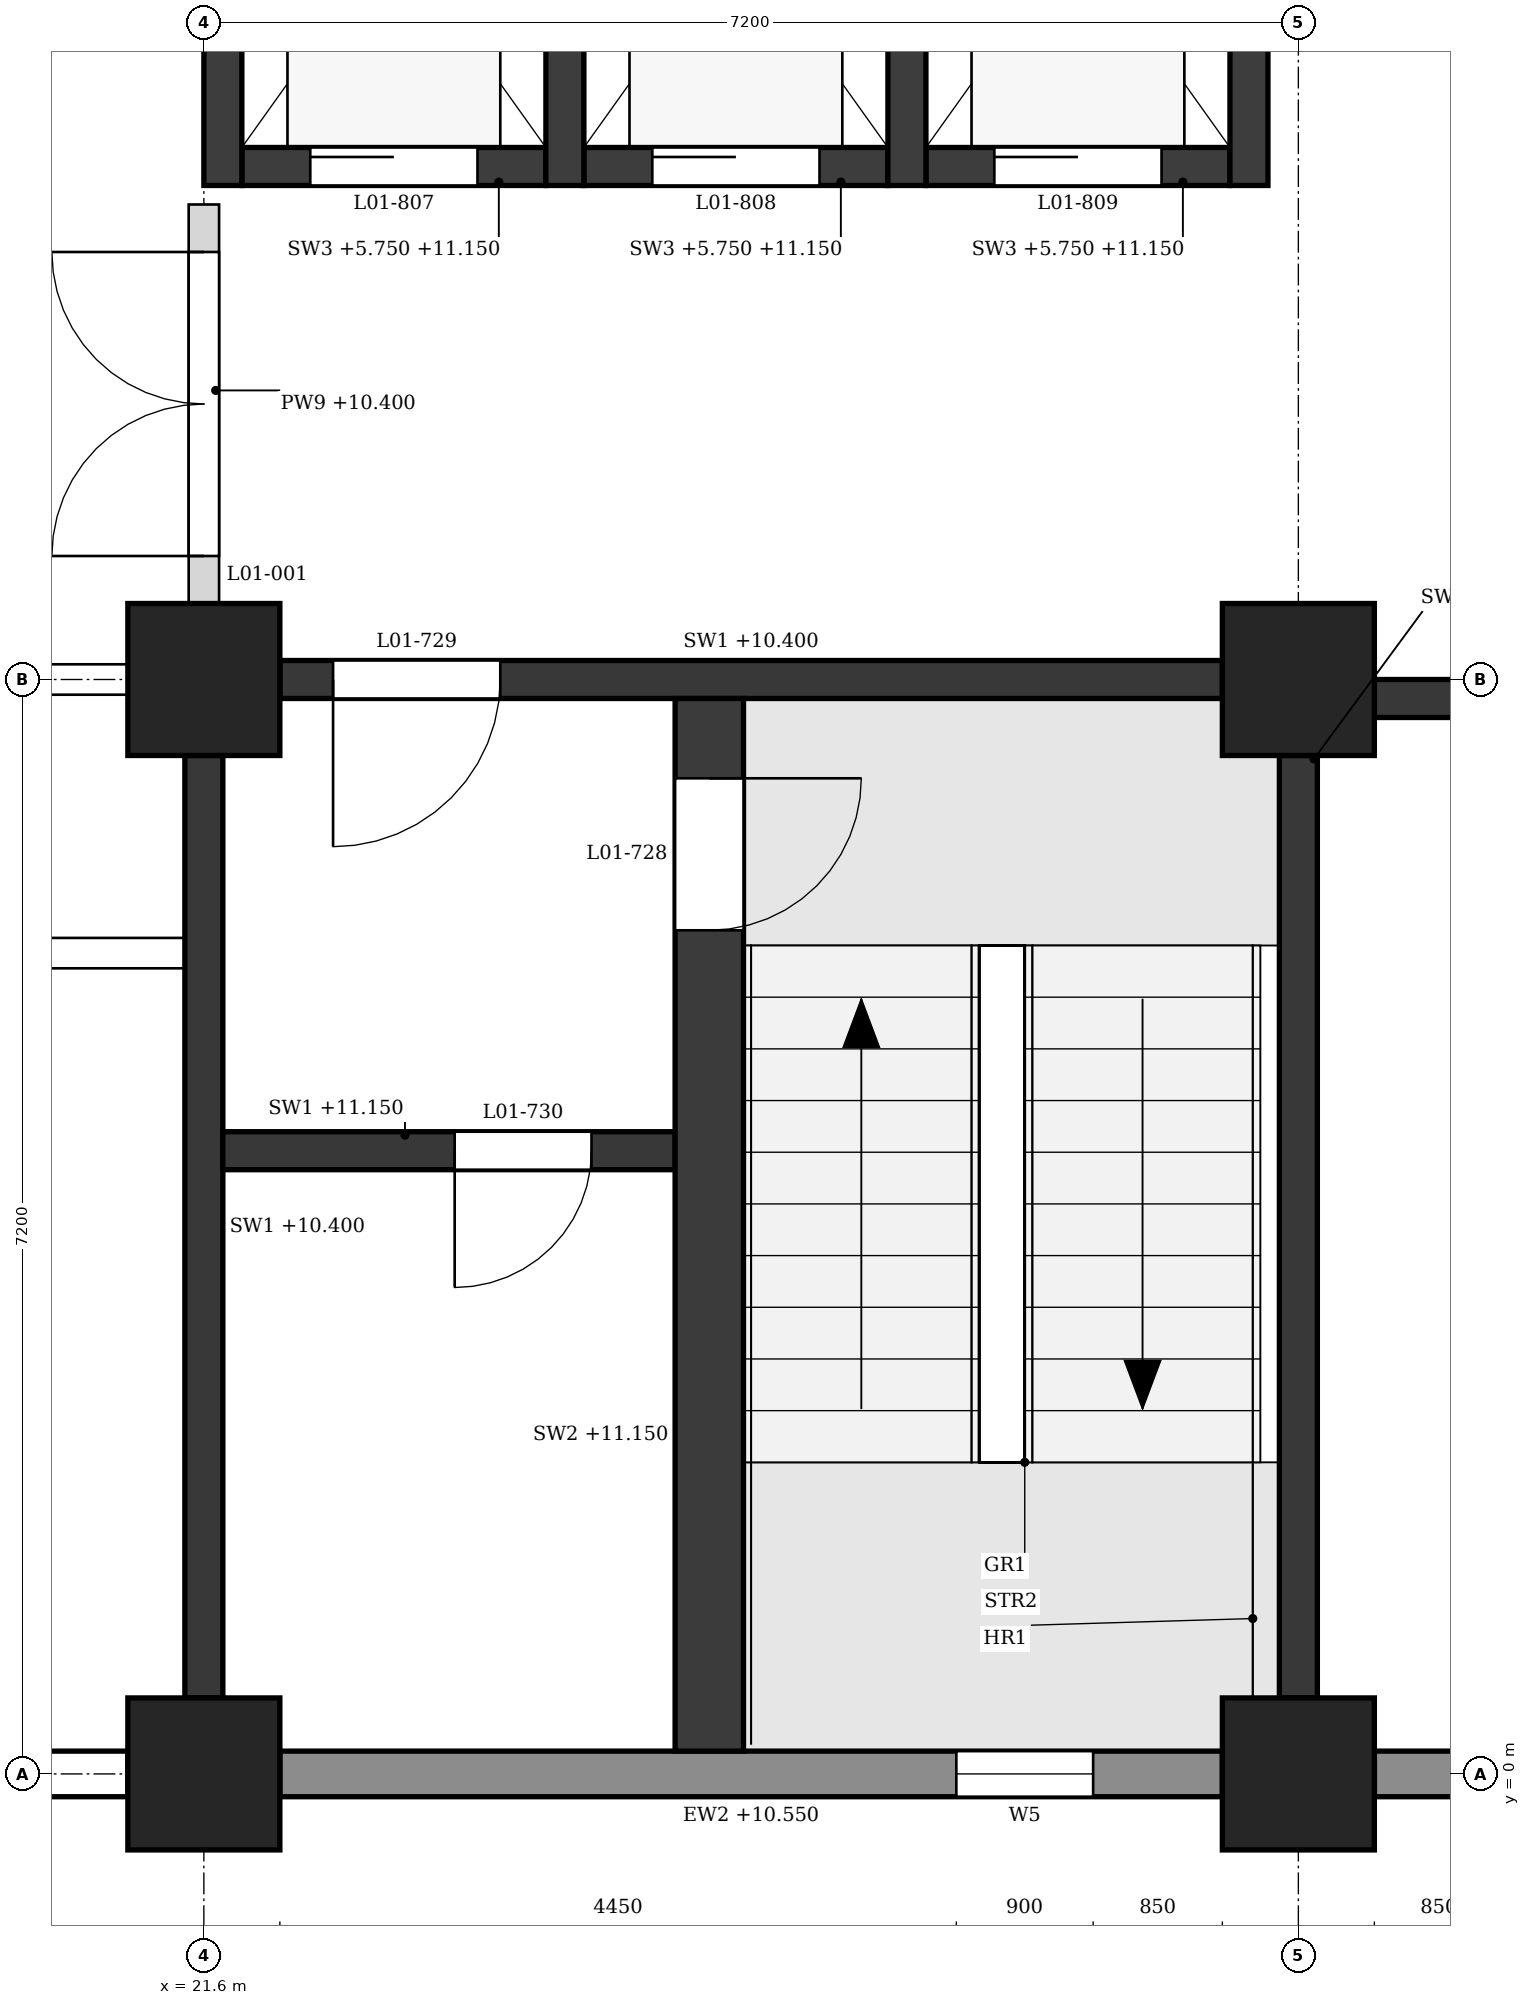
"""IFC4 building model, lengths in metres.
Left out: names, types, materials, properties, quantities, classifications, styles, units other than length and angle.
Written with IfcOpenShell. Run it as: python <this file> out.ifc"""

import sys

from ifc_helpers import new_model, si_unit, direction, frame, frame_2d, origin, origin_2d, place, context, subcontext, project, spatial, polyline, rectangle, outline, extrude, element, fill, save


model = new_model("IFC4")
c1 = context("Model", 3, precision=1e-05, world=origin(), true_north=direction((0.0, 1.0)))
c2 = subcontext(c1, "Body", "Model", "MODEL_VIEW")
j1 = project(units=[si_unit("LENGTHUNIT", "METRE"), si_unit("PLANEANGLEUNIT", "RADIAN")], contexts=[c1])
p1 = place(None, origin())
s1 = spatial("IfcSite", under=j1, at=p1, CompositionType="ELEMENT")
p2 = place(p1, origin())
s2 = spatial("IfcBuilding", under=s1, at=p2, CompositionType="ELEMENT")
p3 = place(p2, frame((0.0, 0.0, 6.0)))
s3 = spatial("IfcBuildingStorey", under=s2, at=p3, CompositionType="ELEMENT", Elevation=6.0)
for number, where, z_axis, x_axis in (
    (1, (21.6, 0.0, 0.0), (0.0, 0.0, 1.0), (1.0, 0.0, 0.0)),
    (2, (21.6, 7.2, 0.0), (0.0, 0.0, 1.0), (1.0, 0.0, 0.0)),
    (3, (28.8, 0.0, 0.0), (0.0, 0.0, 1.0), (1.0, 0.0, 0.0)),
    (4, (28.8, 7.2, 0.0), (0.0, 0.0, 1.0), (1.0, 0.0, 0.0)),
):
    element("IfcColumn", number, at=place(p3, frame(where, z_axis=z_axis, x_axis=x_axis)), inside=s3, PredefinedType="COLUMN", context=c2, shape_type="SweptSolid", body=[
        extrude(rectangle(XDim=1.0, YDim=1.0, at=origin_2d()), origin(), (0.0, 0.0, 1.0), 5.4),
    ])
p4 = place(p3, frame((14.9, 0.0, 0.0), z_axis=(0.0, 0.0, 1.0), x_axis=(1.0, 0.0, 0.0)))
e5 = element("IfcWall", 5, at=p4, inside=s3, PredefinedType="STANDARD", context=c2, shape_type="SweptSolid", body=[
    extrude(rectangle(XDim=6.2, YDim=0.3, at=frame_2d((3.1, 0.0))), origin(), (0.0, 0.0, 1.0), 4.55),
])
p5 = place(p4, frame((0.55, 0.0, 0.9)))
e6 = element("IfcOpeningElement", 6, at=p5, cuts=e5, PredefinedType="OPENING", context=c2, shape_type="SweptSolid", body=[
    extrude(outline(polyline([(0.0, 0.0), (1.5, 0.0), (1.5, 2.85), (0.75, 3.6), (0.0, 2.85), (0.0, 0.0)])), frame((0.0, 0.16, 0.0), z_axis=(0.0, -1.0, 0.0), x_axis=(1.0, 0.0, 0.0)), (0.0, 0.0, 1.0), 0.32),
])
p6 = place(p4, frame((4.15, 0.0, 0.9)))
e7 = element("IfcOpeningElement", 7, at=p6, cuts=e5, PredefinedType="OPENING", context=c2, shape_type="SweptSolid", body=[
    extrude(outline(polyline([(0.0, 0.0), (1.5, 0.0), (1.5, 2.85), (0.75, 3.6), (0.0, 2.85), (0.0, 0.0)])), frame((0.0, 0.16, 0.0), z_axis=(0.0, -1.0, 0.0), x_axis=(1.0, 0.0, 0.0)), (0.0, 0.0, 1.0), 0.32),
])
p7 = place(p3, frame((22.1, 0.0, 0.0), z_axis=(0.0, 0.0, 1.0), x_axis=(1.0, 0.0, 0.0)))
e8 = element("IfcWall", 8, at=p7, inside=s3, PredefinedType="STANDARD", context=c2, shape_type="SweptSolid", body=[
    extrude(rectangle(XDim=6.2, YDim=0.3, at=frame_2d((3.1, 0.0))), origin(), (0.0, 0.0, 1.0), 4.55),
])
p8 = place(p7, frame((4.45, 0.0, 0.9)))
e9 = element("IfcOpeningElement", 9, at=p8, cuts=e8, PredefinedType="OPENING", context=c2, shape_type="SweptSolid", body=[
    extrude(outline(polyline([(0.0, 0.0), (0.9, 0.0), (0.9, 3.15), (0.45, 3.6), (0.0, 3.15), (0.0, 0.0)])), frame((0.0, 0.16, 0.0), z_axis=(0.0, -1.0, 0.0), x_axis=(1.0, 0.0, 0.0)), (0.0, 0.0, 1.0), 0.32),
])
p9 = place(p3, frame((29.3, 0.0, 0.0), z_axis=(0.0, 0.0, 1.0), x_axis=(1.0, 0.0, 0.0)))
e10 = element("IfcWall", 10, at=p9, inside=s3, PredefinedType="STANDARD", context=c2, shape_type="SweptSolid", body=[
    extrude(rectangle(XDim=6.275, YDim=0.3, at=frame_2d((3.137, 0.0))), origin(), (0.0, 0.0, 1.0), 4.7),
])
p10 = place(p9, frame((0.85, 0.0, 0.9)))
e11 = element("IfcOpeningElement", 11, at=p10, cuts=e10, PredefinedType="OPENING", context=c2, shape_type="SweptSolid", body=[
    extrude(outline(polyline([(0.0, 0.0), (0.9, 0.0), (0.9, 3.15), (0.45, 3.6), (0.0, 3.15), (0.0, 0.0)])), frame((0.0, 0.16, 0.0), z_axis=(0.0, -1.0, 0.0), x_axis=(1.0, 0.0, 0.0)), (0.0, 0.0, 1.0), 0.32),
])
p11 = place(p3, frame((29.3, 7.075, 0.0), z_axis=(0.0, 0.0, 1.0), x_axis=(1.0, 0.0, 0.0)))
e12 = element("IfcWall", 12, at=p11, inside=s3, PredefinedType="SHEAR", context=c2, shape_type="SweptSolid", body=[
    extrude(rectangle(XDim=6.275, YDim=0.25, at=frame_2d((3.137, 0.0))), origin(), (0.0, 0.0, 1.0), 4.7),
])
p12 = place(p3, frame((28.8, 0.5, -0.25), z_axis=(0.0, 0.0, 1.0), x_axis=(0.0, 1.0, 0.0)))
e13 = element("IfcWall", 13, at=p12, inside=s3, PredefinedType="SHEAR", context=c2, shape_type="SweptSolid", body=[
    extrude(rectangle(XDim=6.2, YDim=0.25, at=frame_2d((3.1, 0.0))), origin(), (0.0, 0.0, 1.0), 4.8),
])
p13 = place(p3, frame((22.1, 7.2, 0.0), z_axis=(0.0, 0.0, 1.0), x_axis=(1.0, 0.0, 0.0)))
e14 = element("IfcWall", 14, at=p13, inside=s3, PredefinedType="SHEAR", context=c2, shape_type="SweptSolid", body=[
    extrude(rectangle(XDim=6.2, YDim=0.25, at=frame_2d((3.1, 0.0))), origin(), (0.0, 0.0, 1.0), 4.4),
])
p14 = place(p13, frame((0.35, 0.0, 0.0)))
e15 = element("IfcOpeningElement", 15, at=p14, cuts=e14, PredefinedType="OPENING", context=c2, shape_type="SweptSolid", body=[
    extrude(rectangle(XDim=1.1, YDim=2.1, at=frame_2d((0.55, 1.05))), frame((0.0, 0.135, 0.0), z_axis=(0.0, -1.0, 0.0), x_axis=(1.0, 0.0, 0.0)), (0.0, 0.0, 1.0), 0.27),
])
p15 = place(p3, frame((21.6, 0.5, 0.0), z_axis=(0.0, 0.0, 1.0), x_axis=(0.0, 1.0, 0.0)))
e16 = element("IfcWall", 16, at=p15, inside=s3, PredefinedType="SHEAR", context=c2, shape_type="SweptSolid", body=[
    extrude(rectangle(XDim=6.2, YDim=0.25, at=frame_2d((3.1, 0.0))), origin(), (0.0, 0.0, 1.0), 4.4),
])
p16 = place(p3, frame((24.925, 0.15, 0.0), z_axis=(0.0, 0.0, 1.0), x_axis=(0.0, 1.0, 0.0)))
e17 = element("IfcWall", 17, at=p16, inside=s3, PredefinedType="SHEAR", context=c2, shape_type="SweptSolid", body=[
    extrude(rectangle(XDim=6.925, YDim=0.45, at=frame_2d((3.462, 0.0))), origin(), (0.0, 0.0, 1.0), 5.15),
])
p17 = place(p16, frame((5.4, 0.0, 0.0)))
e18 = element("IfcOpeningElement", 18, at=p17, cuts=e17, PredefinedType="OPENING", context=c2, shape_type="SweptSolid", body=[
    extrude(rectangle(XDim=1.0, YDim=2.1, at=frame_2d((0.5, 1.05))), frame((0.0, 0.235, 0.0), z_axis=(0.0, -1.0, 0.0), x_axis=(1.0, 0.0, 0.0)), (0.0, 0.0, 1.0), 0.47),
])
p18 = place(p3, frame((21.725, 4.1, 0.0), z_axis=(0.0, 0.0, 1.0), x_axis=(1.0, 0.0, 0.0)))
e19 = element("IfcWall", 19, at=p18, inside=s3, PredefinedType="SHEAR", context=c2, shape_type="SweptSolid", body=[
    extrude(rectangle(XDim=2.975, YDim=0.25, at=frame_2d((1.487, 0.0))), origin(), (0.0, 0.0, 1.0), 5.15),
])
p19 = place(p18, frame((1.525, 0.0, 0.0)))
e20 = element("IfcOpeningElement", 20, at=p19, cuts=e19, PredefinedType="OPENING", context=c2, shape_type="SweptSolid", body=[
    extrude(rectangle(XDim=0.9, YDim=2.1, at=frame_2d((0.45, 1.05))), frame((0.0, 0.135, 0.0), z_axis=(0.0, -1.0, 0.0), x_axis=(1.0, 0.0, 0.0)), (0.0, 0.0, 1.0), 0.27),
])
p20 = place(p3, frame((21.725, 10.45, -0.25), z_axis=(0.0, 0.0, 1.0), x_axis=(0.0, 1.0, 0.0)))
e21 = element("IfcWall", 21, at=p20, inside=s3, PredefinedType="SHEAR", context=c2, shape_type="SweptSolid", body=[
    extrude(rectangle(XDim=3.45, YDim=0.25, at=frame_2d((1.725, 0.0))), origin(), (0.0, 0.0, 1.0), 4.65),
])
for number, where, z_axis, x_axis in (
    (22, (23.975, 10.45, -0.25), (0.0, 0.0, 1.0), (0.0, 1.0, 0.0)),
    (23, (26.225, 10.45, -0.25), (0.0, 0.0, 1.0), (0.0, 1.0, 0.0)),
):
    element("IfcWall", number, at=place(p3, frame(where, z_axis=z_axis, x_axis=x_axis)), inside=s3, PredefinedType="SHEAR", context=c2, shape_type="SweptSolid", body=[
        extrude(rectangle(XDim=3.3, YDim=0.25, at=frame_2d((1.65, 0.0))), origin(), (0.0, 0.0, 1.0), 5.4),
    ])
p21 = place(p3, frame((28.475, 10.45, -0.25), z_axis=(0.0, 0.0, 1.0), x_axis=(0.0, 1.0, 0.0)))
e24 = element("IfcWall", 24, at=p21, inside=s3, PredefinedType="SHEAR", context=c2, shape_type="SweptSolid", body=[
    extrude(rectangle(XDim=3.45, YDim=0.25, at=frame_2d((1.725, 0.0))), origin(), (0.0, 0.0, 1.0), 5.4),
])
p22 = place(p3, frame((21.85, 10.575, -0.25), z_axis=(0.0, 0.0, 1.0), x_axis=(1.0, 0.0, 0.0)))
e25 = element("IfcWall", 25, at=p22, inside=s3, PredefinedType="SHEAR", context=c2, shape_type="SweptSolid", body=[
    extrude(rectangle(XDim=2.0, YDim=0.25, at=frame_2d((1.0, 0.0))), origin(), (0.0, 0.0, 1.0), 5.4),
])
p23 = place(p22, frame((0.45, 0.0, 0.25)))
e26 = element("IfcOpeningElement", 26, at=p23, cuts=e25, PredefinedType="OPENING", context=c2, shape_type="SweptSolid", body=[
    extrude(rectangle(XDim=1.1, YDim=2.1, at=frame_2d((0.55, 1.05))), frame((0.0, 0.135, 0.0), z_axis=(0.0, -1.0, 0.0), x_axis=(1.0, 0.0, 0.0)), (0.0, 0.0, 1.0), 0.27),
])
p24 = place(p3, frame((24.1, 10.575, -0.25), z_axis=(0.0, 0.0, 1.0), x_axis=(1.0, 0.0, 0.0)))
e27 = element("IfcWall", 27, at=p24, inside=s3, PredefinedType="SHEAR", context=c2, shape_type="SweptSolid", body=[
    extrude(rectangle(XDim=2.0, YDim=0.25, at=frame_2d((1.0, 0.0))), origin(), (0.0, 0.0, 1.0), 5.4),
])
p25 = place(p24, frame((0.45, 0.0, 0.25)))
e28 = element("IfcOpeningElement", 28, at=p25, cuts=e27, PredefinedType="OPENING", context=c2, shape_type="SweptSolid", body=[
    extrude(rectangle(XDim=1.1, YDim=2.1, at=frame_2d((0.55, 1.05))), frame((0.0, 0.135, 0.0), z_axis=(0.0, -1.0, 0.0), x_axis=(1.0, 0.0, 0.0)), (0.0, 0.0, 1.0), 0.27),
])
p26 = place(p3, frame((26.35, 10.575, -0.25), z_axis=(0.0, 0.0, 1.0), x_axis=(1.0, 0.0, 0.0)))
e29 = element("IfcWall", 29, at=p26, inside=s3, PredefinedType="SHEAR", context=c2, shape_type="SweptSolid", body=[
    extrude(rectangle(XDim=2.0, YDim=0.25, at=frame_2d((1.0, 0.0))), origin(), (0.0, 0.0, 1.0), 5.4),
])
p27 = place(p26, frame((0.45, 0.0, 0.25)))
e30 = element("IfcOpeningElement", 30, at=p27, cuts=e29, PredefinedType="OPENING", context=c2, shape_type="SweptSolid", body=[
    extrude(rectangle(XDim=1.1, YDim=2.1, at=frame_2d((0.55, 1.05))), frame((0.0, 0.135, 0.0), z_axis=(0.0, -1.0, 0.0), x_axis=(1.0, 0.0, 0.0)), (0.0, 0.0, 1.0), 0.27),
])
p28 = place(p2, origin())
s4 = spatial("IfcBuildingStorey", under=s2, at=p28, CompositionType="ELEMENT", Elevation=0.0)
p29 = place(p28, frame((29.3, 7.4, 0.0), z_axis=(0.0, 0.0, 1.0), x_axis=(1.0, 0.0, 0.0)))
e31 = element("IfcWall", 31, at=p29, inside=s4, PredefinedType="SOLIDWALL", context=c2, shape_type="SweptSolid", body=[
    extrude(rectangle(XDim=6.275, YDim=0.4, at=frame_2d((3.137, 0.0))), origin(), (0.0, 0.0, 1.0), 10.7),
])
p30 = place(p28, frame((29.0, 7.7, 0.0), z_axis=(0.0, 0.0, 1.0), x_axis=(0.0, 1.0, 0.0)))
e32 = element("IfcWall", 32, at=p30, inside=s4, PredefinedType="SOLIDWALL", context=c2, shape_type="SweptSolid", body=[
    extrude(rectangle(XDim=6.2, YDim=0.4, at=frame_2d((3.1, 0.0))), origin(), (0.0, 0.0, 1.0), 10.55),
])
p31 = place(p3, frame((7.325, 5.4, 0.0), z_axis=(0.0, 0.0, 1.0), x_axis=(1.0, 0.0, 0.0)))
e33 = element("IfcWall", 33, at=p31, inside=s3, PredefinedType="PARTITIONING", context=c2, shape_type="SweptSolid", body=[
    extrude(outline(polyline([(0.0, 0.0), (14.15, 0.0), (14.15, 4.4), (14.025, 4.4), (14.025, 5.15), (7.325, 5.15), (7.325, 4.4), (6.825, 4.4), (6.825, 5.15), (0.125, 5.15), (0.125, 4.4), (0.0, 4.4), (0.0, 0.0)])), frame((0.0, 0.1, 0.0), z_axis=(0.0, -1.0, 0.0), x_axis=(1.0, 0.0, 0.0)), (0.0, 0.0, 1.0), 0.2),
])
p32 = place(p31, frame((1.238, 0.0, 0.0)))
e34 = element("IfcOpeningElement", 34, at=p32, cuts=e33, PredefinedType="OPENING", context=c2, shape_type="SweptSolid", body=[
    extrude(rectangle(XDim=1.0, YDim=2.1, at=frame_2d((0.5, 1.05))), frame((0.0, 0.11, 0.0), z_axis=(0.0, -1.0, 0.0), x_axis=(1.0, 0.0, 0.0)), (0.0, 0.0, 1.0), 0.22),
])
p33 = place(p31, frame((4.775, 0.0, 0.0)))
e35 = element("IfcOpeningElement", 35, at=p33, cuts=e33, PredefinedType="OPENING", context=c2, shape_type="SweptSolid", body=[
    extrude(rectangle(XDim=1.0, YDim=2.1, at=frame_2d((0.5, 1.05))), frame((0.0, 0.11, 0.0), z_axis=(0.0, -1.0, 0.0), x_axis=(1.0, 0.0, 0.0)), (0.0, 0.0, 1.0), 0.22),
])
p34 = place(p31, frame((8.375, 0.0, 0.0)))
e36 = element("IfcOpeningElement", 36, at=p34, cuts=e33, PredefinedType="OPENING", context=c2, shape_type="SweptSolid", body=[
    extrude(rectangle(XDim=1.0, YDim=2.1, at=frame_2d((0.5, 1.05))), frame((0.0, 0.11, 0.0), z_axis=(0.0, -1.0, 0.0), x_axis=(1.0, 0.0, 0.0)), (0.0, 0.0, 1.0), 0.22),
])
p35 = place(p31, frame((11.913, 0.0, 0.0)))
e37 = element("IfcOpeningElement", 37, at=p35, cuts=e33, PredefinedType="OPENING", context=c2, shape_type="SweptSolid", body=[
    extrude(rectangle(XDim=1.0, YDim=2.1, at=frame_2d((0.5, 1.05))), frame((0.0, 0.11, 0.0), z_axis=(0.0, -1.0, 0.0), x_axis=(1.0, 0.0, 0.0)), (0.0, 0.0, 1.0), 0.22),
])
p36 = place(p3, frame((14.9, 7.2, 0.0), z_axis=(0.0, 0.0, 1.0), x_axis=(1.0, 0.0, 0.0)))
e38 = element("IfcWall", 38, at=p36, inside=s3, PredefinedType="PARTITIONING", context=c2, shape_type="SweptSolid", body=[
    extrude(rectangle(XDim=6.2, YDim=0.2, at=frame_2d((3.1, 0.0))), origin(), (0.0, 0.0, 1.0), 4.4),
])
p37 = place(p36, frame((4.15, 0.0, 0.0)))
e39 = element("IfcOpeningElement", 39, at=p37, cuts=e38, PredefinedType="OPENING", context=c2, shape_type="SweptSolid", body=[
    extrude(rectangle(XDim=1.0, YDim=2.1, at=frame_2d((0.5, 1.05))), frame((0.0, 0.11, 0.0), z_axis=(0.0, -1.0, 0.0), x_axis=(1.0, 0.0, 0.0)), (0.0, 0.0, 1.0), 0.22),
])
p38 = place(p3, frame((21.6, 7.7, 0.0), z_axis=(0.0, 0.0, 1.0), x_axis=(0.0, 1.0, 0.0)))
e40 = element("IfcWall", 40, at=p38, inside=s3, PredefinedType="PARTITIONING", context=c2, shape_type="SweptSolid", body=[
    extrude(rectangle(XDim=2.625, YDim=0.2, at=frame_2d((1.312, 0.0))), origin(), (0.0, 0.0, 1.0), 4.4),
])
p39 = place(p38, frame((0.312, 0.0, 0.0)))
e41 = element("IfcOpeningElement", 41, at=p39, cuts=e40, PredefinedType="OPENING", context=c2, shape_type="SweptSolid", body=[
    extrude(rectangle(XDim=2.0, YDim=2.4, at=frame_2d((1.0, 1.2))), frame((0.0, 0.11, 0.0), z_axis=(0.0, -1.0, 0.0), x_axis=(1.0, 0.0, 0.0)), (0.0, 0.0, 1.0), 0.22),
])
p40 = place(p8, origin())
e42 = element("IfcWindow", 42, at=p40, inside=s3, PartitioningType="SINGLE_PANEL", PredefinedType="WINDOW", context=c2, shape_type="SweptSolid", body=[
    extrude(outline(polyline([(0.0, 0.0), (0.9, 0.0), (0.9, 3.15), (0.45, 3.6), (0.0, 3.15), (0.0, 0.0)])), frame((0.0, 0.03, 0.0), z_axis=(0.0, -1.0, 0.0), x_axis=(1.0, 0.0, 0.0)), (0.0, 0.0, 1.0), 0.06),
])
fill(e9, e42)
p41 = place(p17, frame((1.0, 0.0, 0.0), z_axis=(0.0, 0.0, 1.0), x_axis=(-1.0, 0.0, 0.0)))
e43 = element("IfcDoor", 43, at=p41, inside=s3, OperationType="SINGLE_SWING_LEFT", PredefinedType="DOOR", context=c2, shape_type="SweptSolid", body=[
    extrude(rectangle(XDim=1.0, YDim=2.1, at=frame_2d((0.5, 1.05))), frame((0.0, 0.025, 0.0), z_axis=(0.0, -1.0, 0.0), x_axis=(1.0, 0.0, 0.0)), (0.0, 0.0, 1.0), 0.05),
])
fill(e18, e43)
p42 = place(p14, frame((1.1, 0.0, 0.0), z_axis=(0.0, 0.0, 1.0), x_axis=(-1.0, 0.0, 0.0)))
e44 = element("IfcDoor", 44, at=p42, inside=s3, OperationType="SINGLE_SWING_RIGHT", PredefinedType="DOOR", context=c2, shape_type="SweptSolid", body=[
    extrude(rectangle(XDim=1.1, YDim=2.1, at=frame_2d((0.55, 1.05))), frame((0.0, 0.025, 0.0), z_axis=(0.0, -1.0, 0.0), x_axis=(1.0, 0.0, 0.0)), (0.0, 0.0, 1.0), 0.05),
])
fill(e15, e44)
p43 = place(p19, frame((0.9, 0.0, 0.0), z_axis=(0.0, 0.0, 1.0), x_axis=(-1.0, 0.0, 0.0)))
e45 = element("IfcDoor", 45, at=p43, inside=s3, OperationType="SINGLE_SWING_RIGHT", PredefinedType="DOOR", context=c2, shape_type="SweptSolid", body=[
    extrude(rectangle(XDim=0.9, YDim=2.1, at=frame_2d((0.45, 1.05))), frame((0.0, 0.025, 0.0), z_axis=(0.0, -1.0, 0.0), x_axis=(1.0, 0.0, 0.0)), (0.0, 0.0, 1.0), 0.05),
])
fill(e20, e45)
p44 = place(p23, origin())
e46 = element("IfcDoor", 46, at=p44, inside=s3, OperationType="SLIDING_TO_LEFT", PredefinedType="DOOR", context=c2, shape_type="SweptSolid", body=[
    extrude(rectangle(XDim=1.1, YDim=2.1, at=frame_2d((0.55, 1.05))), frame((0.0, 0.025, 0.0), z_axis=(0.0, -1.0, 0.0), x_axis=(1.0, 0.0, 0.0)), (0.0, 0.0, 1.0), 0.05),
])
fill(e26, e46)
p45 = place(p25, origin())
e47 = element("IfcDoor", 47, at=p45, inside=s3, OperationType="SLIDING_TO_LEFT", PredefinedType="DOOR", context=c2, shape_type="SweptSolid", body=[
    extrude(rectangle(XDim=1.1, YDim=2.1, at=frame_2d((0.55, 1.05))), frame((0.0, 0.025, 0.0), z_axis=(0.0, -1.0, 0.0), x_axis=(1.0, 0.0, 0.0)), (0.0, 0.0, 1.0), 0.05),
])
fill(e28, e47)
p46 = place(p27, origin())
e48 = element("IfcDoor", 48, at=p46, inside=s3, OperationType="SLIDING_TO_LEFT", PredefinedType="DOOR", context=c2, shape_type="SweptSolid", body=[
    extrude(rectangle(XDim=1.1, YDim=2.1, at=frame_2d((0.55, 1.05))), frame((0.0, 0.025, 0.0), z_axis=(0.0, -1.0, 0.0), x_axis=(1.0, 0.0, 0.0)), (0.0, 0.0, 1.0), 0.05),
])
fill(e30, e48)
p47 = place(p39, origin())
e49 = element("IfcDoor", 49, at=p47, inside=s3, OperationType="DOUBLE_DOOR_SINGLE_SWING", PredefinedType="DOOR", context=c2, shape_type="SweptSolid", body=[
    extrude(rectangle(XDim=2.0, YDim=2.4, at=frame_2d((1.0, 1.2))), frame((0.0, 0.025, 0.0), z_axis=(0.0, -1.0, 0.0), x_axis=(1.0, 0.0, 0.0)), (0.0, 0.0, 1.0), 0.05),
])
fill(e41, e49)
save(model, sys.argv[1])
